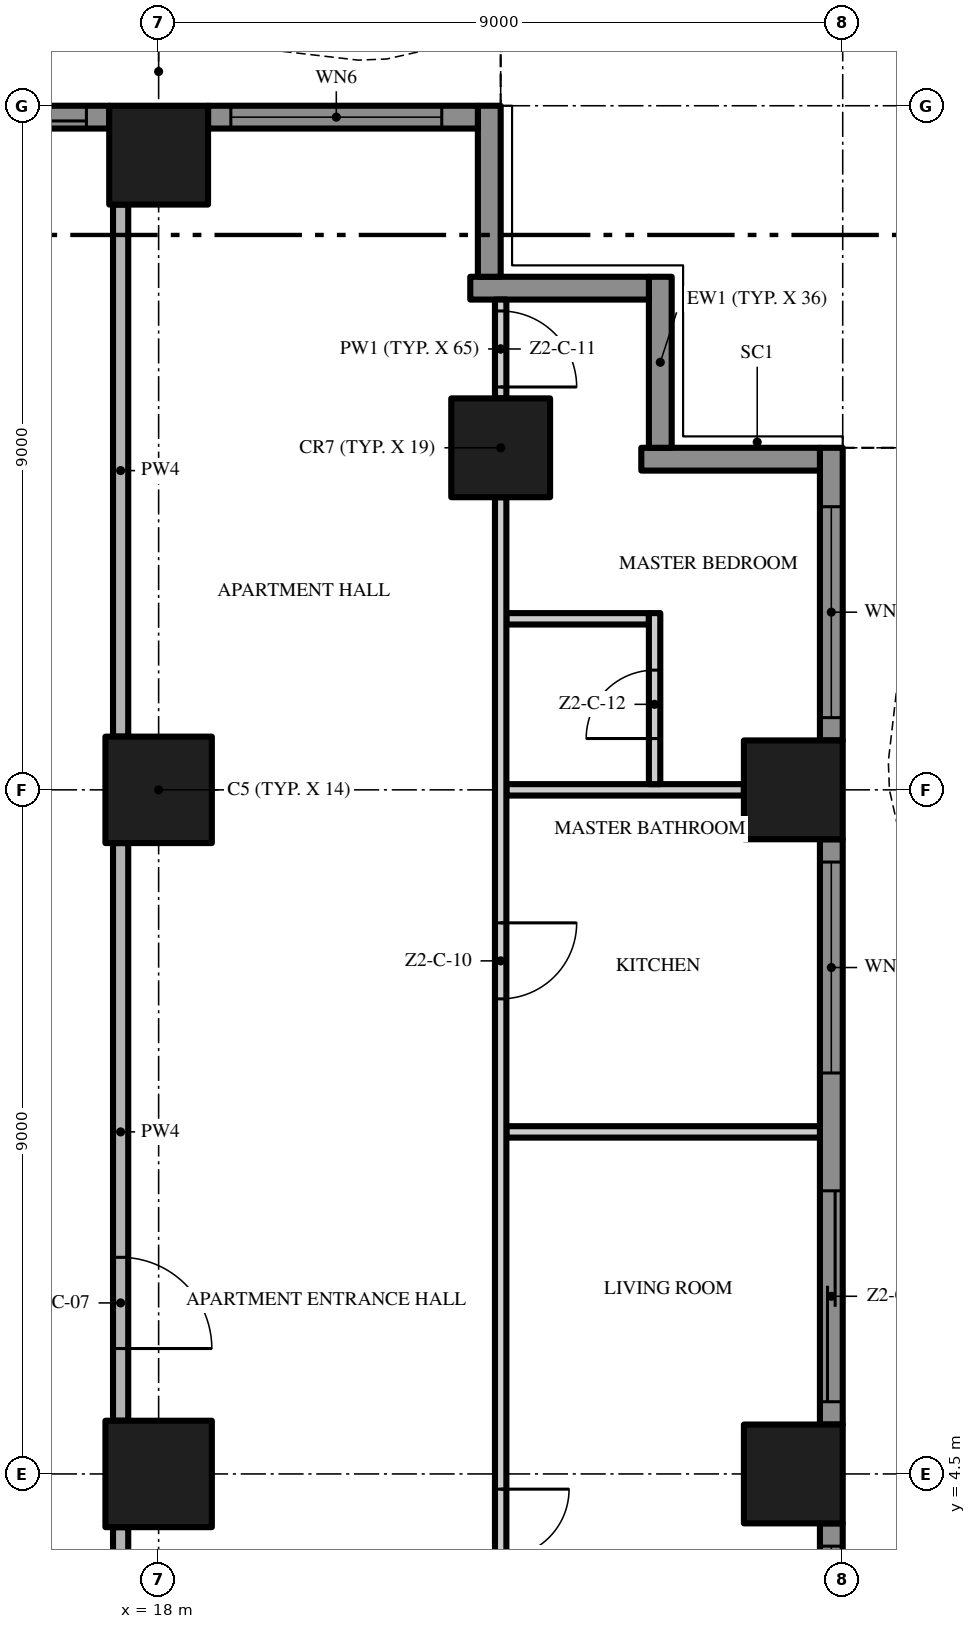
"""IFC4 building model, lengths in metres.
Left out: names, types, materials, properties, quantities, classifications, styles, units other than length and angle.
Written with IfcOpenShell. Run it as: python <this file> out.ifc"""

import sys

from ifc_helpers import new_model, si_unit, direction, frame, frame_2d, origin, origin_2d, place, context, subcontext, project, spatial, polyline, rectangle, outline, extrude, element, fill, save


model = new_model("IFC4")
c1 = context("Model", 3, precision=1e-05, world=origin(), true_north=direction((0.0, 1.0)))
c2 = subcontext(c1, "Body", "Model", "MODEL_VIEW")
j1 = project(units=[si_unit("LENGTHUNIT", "METRE"), si_unit("PLANEANGLEUNIT", "RADIAN")], contexts=[c1])
p1 = place(None, origin())
s1 = spatial("IfcSite", under=j1, at=p1, CompositionType="ELEMENT")
p2 = place(p1, origin())
s2 = spatial("IfcBuilding", under=s1, at=p2, CompositionType="ELEMENT")
p3 = place(p2, frame((0.0, 0.0, 96.0)))
s3 = spatial("IfcBuildingStorey", under=s2, at=p3, CompositionType="ELEMENT", Elevation=96.0)
p4 = place(p3, frame((18.0, 13.5, 0.0), z_axis=(0.0, 0.0, 1.0), x_axis=(1.0, 0.0, 0.0)))
e1 = element("IfcColumn", 1, at=p4, inside=s3, PredefinedType="COLUMN", context=c2, shape_type="SweptSolid", body=[
    extrude(rectangle(XDim=1.4, YDim=1.4, at=origin_2d()), origin(), (0.0, 0.0, 1.0), 3.5),
])
p5 = place(p3, frame((18.0, 21.85, 0.0), z_axis=(0.0, 0.0, 1.0), x_axis=(1.0, 0.0, 0.0)))
e2 = element("IfcColumn", 2, at=p5, inside=s3, PredefinedType="COLUMN", context=c2, shape_type="SweptSolid", body=[
    extrude(rectangle(XDim=1.3, YDim=1.3, at=origin_2d()), origin(), (0.0, 0.0, 1.0), 3.5),
])
p6 = place(p3, frame((18.0, 4.5, 0.0), z_axis=(0.0, 0.0, 1.0), x_axis=(1.0, 0.0, 0.0)))
e3 = element("IfcColumn", 3, at=p6, inside=s3, PredefinedType="COLUMN", context=c2, shape_type="SweptSolid", body=[
    extrude(rectangle(XDim=1.4, YDim=1.4, at=origin_2d()), origin(), (0.0, 0.0, 1.0), 3.5),
])
for number, where, z_axis, x_axis in (
    (4, (26.35, 13.5, 0.0), (0.0, 0.0, 1.0), (1.0, 0.0, 0.0)),
    (5, (22.5, 18.0, 0.0), (0.0, 0.0, 1.0), (1.0, 0.0, 0.0)),
    (6, (26.35, 4.5, 0.0), (0.0, 0.0, 1.0), (1.0, 0.0, 0.0)),
):
    element("IfcColumn", number, at=place(p3, frame(where, z_axis=z_axis, x_axis=x_axis)), inside=s3, PredefinedType="COLUMN", context=c2, shape_type="SweptSolid", body=[
        extrude(rectangle(XDim=1.3, YDim=1.3, at=origin_2d()), origin(), (0.0, 0.0, 1.0), 3.5),
    ])
p7 = place(p3, frame((26.85, 3.85, 0.0), z_axis=(0.0, 0.0, 1.0), x_axis=(0.0, -1.0, 0.0)))
e7 = element("IfcWall", 7, at=p7, inside=s3, PredefinedType="SOLIDWALL", context=c2, shape_type="SweptSolid", body=[
    extrude(rectangle(XDim=7.7, YDim=0.3, at=frame_2d((3.85, 0.0))), origin(), (0.0, 0.0, 1.0), 3.5),
])
p8 = place(p7, frame((4.625, 0.0, 0.45)))
e8 = element("IfcOpeningElement", 8, at=p8, cuts=e7, PredefinedType="OPENING", context=c2, shape_type="SweptSolid", body=[
    extrude(rectangle(XDim=2.775, YDim=2.65, at=frame_2d((1.387, 1.325))), frame((0.0, 0.16, 0.0), z_axis=(0.0, -1.0, 0.0), x_axis=(1.0, 0.0, 0.0)), (0.0, 0.0, 1.0), 0.32),
])
p9 = place(p7, frame((0.3, 0.0, 0.45)))
e9 = element("IfcOpeningElement", 9, at=p9, cuts=e7, PredefinedType="OPENING", context=c2, shape_type="SweptSolid", body=[
    extrude(rectangle(XDim=2.775, YDim=2.65, at=frame_2d((1.387, 1.325))), frame((0.0, 0.16, 0.0), z_axis=(0.0, -1.0, 0.0), x_axis=(1.0, 0.0, 0.0)), (0.0, 0.0, 1.0), 0.32),
])
p10 = place(p3, frame((26.85, 12.85, 0.0), z_axis=(0.0, 0.0, 1.0), x_axis=(0.0, -1.0, 0.0)))
e10 = element("IfcWall", 10, at=p10, inside=s3, PredefinedType="SOLIDWALL", context=c2, shape_type="SweptSolid", body=[
    extrude(rectangle(XDim=7.7, YDim=0.3, at=frame_2d((3.85, 0.0))), origin(), (0.0, 0.0, 1.0), 3.5),
])
p11 = place(p10, frame((4.625, 0.0, 0.0)))
e11 = element("IfcOpeningElement", 11, at=p11, cuts=e10, PredefinedType="OPENING", context=c2, shape_type="SweptSolid", body=[
    extrude(rectangle(XDim=2.775, YDim=2.4, at=frame_2d((1.387, 1.2))), frame((0.0, 0.16, 0.0), z_axis=(0.0, -1.0, 0.0), x_axis=(1.0, 0.0, 0.0)), (0.0, 0.0, 1.0), 0.32),
])
p12 = place(p10, frame((0.3, 0.0, 0.45)))
e12 = element("IfcOpeningElement", 12, at=p12, cuts=e10, PredefinedType="OPENING", context=c2, shape_type="SweptSolid", body=[
    extrude(rectangle(XDim=2.775, YDim=2.65, at=frame_2d((1.387, 1.325))), frame((0.0, 0.16, 0.0), z_axis=(0.0, -1.0, 0.0), x_axis=(1.0, 0.0, 0.0)), (0.0, 0.0, 1.0), 0.32),
])
p13 = place(p3, frame((26.85, 18.0, 0.0), z_axis=(0.0, 0.0, 1.0), x_axis=(0.0, -1.0, 0.0)))
e13 = element("IfcWall", 13, at=p13, inside=s3, PredefinedType="SOLIDWALL", context=c2, shape_type="SweptSolid", body=[
    extrude(rectangle(XDim=3.85, YDim=0.3, at=frame_2d((1.925, 0.0))), origin(), (0.0, 0.0, 1.0), 3.5),
])
p14 = place(p13, frame((0.775, 0.0, 0.45)))
e14 = element("IfcOpeningElement", 14, at=p14, cuts=e13, PredefinedType="OPENING", context=c2, shape_type="SweptSolid", body=[
    extrude(rectangle(XDim=2.775, YDim=2.65, at=frame_2d((1.387, 1.325))), frame((0.0, 0.16, 0.0), z_axis=(0.0, -1.0, 0.0), x_axis=(1.0, 0.0, 0.0)), (0.0, 0.0, 1.0), 0.32),
])
p15 = place(p3, frame((24.35, 17.85, 0.0), z_axis=(0.0, 0.0, 1.0), x_axis=(1.0, 0.0, 0.0)))
e15 = element("IfcWall", 15, at=p15, inside=s3, PredefinedType="SOLIDWALL", context=c2, shape_type="SweptSolid", body=[
    extrude(rectangle(XDim=2.35, YDim=0.3, at=frame_2d((1.175, 0.0))), origin(), (0.0, 0.0, 1.0), 3.5),
])
p16 = place(p3, frame((24.6, 20.25, 0.0), z_axis=(0.0, 0.0, 1.0), x_axis=(0.0, -1.0, 0.0)))
e16 = element("IfcWall", 16, at=p16, inside=s3, PredefinedType="SOLIDWALL", context=c2, shape_type="SweptSolid", body=[
    extrude(rectangle(XDim=2.25, YDim=0.3, at=frame_2d((1.125, 0.0))), origin(), (0.0, 0.0, 1.0), 3.5),
])
p17 = place(p3, frame((22.1, 20.1, 0.0), z_axis=(0.0, 0.0, 1.0), x_axis=(1.0, 0.0, 0.0)))
e17 = element("IfcWall", 17, at=p17, inside=s3, PredefinedType="SOLIDWALL", context=c2, shape_type="SweptSolid", body=[
    extrude(rectangle(XDim=2.35, YDim=0.3, at=frame_2d((1.175, 0.0))), origin(), (0.0, 0.0, 1.0), 3.5),
])
p18 = place(p3, frame((22.35, 22.5, 0.0), z_axis=(0.0, 0.0, 1.0), x_axis=(0.0, -1.0, 0.0)))
e18 = element("IfcWall", 18, at=p18, inside=s3, PredefinedType="SOLIDWALL", context=c2, shape_type="SweptSolid", body=[
    extrude(rectangle(XDim=2.25, YDim=0.3, at=frame_2d((1.125, 0.0))), origin(), (0.0, 0.0, 1.0), 3.5),
])
p19 = place(p3, frame((18.65, 22.35, 0.0), z_axis=(0.0, 0.0, 1.0), x_axis=(1.0, 0.0, 0.0)))
e19 = element("IfcWall", 19, at=p19, inside=s3, PredefinedType="SOLIDWALL", context=c2, shape_type="SweptSolid", body=[
    extrude(rectangle(XDim=3.55, YDim=0.3, at=frame_2d((1.775, 0.0))), origin(), (0.0, 0.0, 1.0), 3.5),
])
p20 = place(p19, frame((0.3, 0.0, 0.45)))
e20 = element("IfcOpeningElement", 20, at=p20, cuts=e19, PredefinedType="OPENING", context=c2, shape_type="SweptSolid", body=[
    extrude(rectangle(XDim=2.775, YDim=2.65, at=frame_2d((1.387, 1.325))), frame((0.0, 0.16, 0.0), z_axis=(0.0, -1.0, 0.0), x_axis=(1.0, 0.0, 0.0)), (0.0, 0.0, 1.0), 0.32),
])
p21 = place(p3, frame((13.5, 22.35, 0.0), z_axis=(0.0, 0.0, 1.0), x_axis=(1.0, 0.0, 0.0)))
e21 = element("IfcWall", 21, at=p21, inside=s3, PredefinedType="SOLIDWALL", context=c2, shape_type="SweptSolid", body=[
    extrude(rectangle(XDim=3.85, YDim=0.3, at=frame_2d((1.925, 0.0))), origin(), (0.0, 0.0, 1.0), 3.5),
])
p22 = place(p21, frame((0.775, 0.0, 0.0)))
e22 = element("IfcOpeningElement", 22, at=p22, cuts=e21, PredefinedType="OPENING", context=c2, shape_type="SweptSolid", body=[
    extrude(rectangle(XDim=2.775, YDim=2.4, at=frame_2d((1.387, 1.2))), frame((0.0, 0.16, 0.0), z_axis=(0.0, -1.0, 0.0), x_axis=(1.0, 0.0, 0.0)), (0.0, 0.0, 1.0), 0.32),
])
p23 = place(p3, origin())
e23 = element("IfcWall", 23, at=p23, inside=s3, PredefinedType="USERDEFINED", context=c2, shape_type="SweptSolid", body=[
    extrude(outline(polyline([(27.951, -18.0), (27.615, -16.5), (27.6, -16.125), (27.731, -15.0), (28.255, -13.5), (28.988, -12.0), (29.649, -10.5), (29.985, -9.0), (30.0, -8.625), (29.869, -7.5), (29.345, -6.0), (28.612, -4.5), (27.951, -3.0), (27.615, -1.5), (27.6, -1.125), (27.731, 0.0), (28.255, 1.5), (28.988, 3.0), (29.649, 4.5), (29.985, 6.0), (30.0, 6.375), (29.869, 7.5), (29.345, 9.0), (28.612, 10.5), (27.951, 12.0), (27.615, 13.5), (27.6, 13.875), (27.731, 15.0), (28.255, 16.5), (28.988, 18.0), (28.763, 18.11), (28.024, 16.596), (27.486, 15.056), (27.349, 13.885), (27.366, 13.467), (27.713, 11.921), (28.385, 10.395), (29.114, 8.904), (29.624, 7.444), (29.749, 6.365), (29.736, 6.033), (29.41, 4.579), (28.761, 3.105), (28.024, 1.596), (27.486, 0.056), (27.349, -1.115), (27.366, -1.533), (27.713, -3.079), (28.385, -4.605), (29.114, -6.096), (29.624, -7.556), (29.749, -8.635), (29.736, -8.967), (29.41, -10.421), (28.761, -11.895), (28.024, -13.404), (27.486, -14.944), (27.349, -16.115), (27.366, -16.533), (27.708, -18.055), (27.951, -18.0)])), origin(), (0.0, 0.0, 1.0), 0.9),
])
p24 = place(p3, origin())
e24 = element("IfcWall", 24, at=p24, inside=s3, PredefinedType="USERDEFINED", context=c2, shape_type="SweptSolid", body=[
    extrude(outline(polyline([(22.5, 23.451), (21.0, 23.115), (20.625, 23.1), (19.5, 23.231), (18.0, 23.755), (16.5, 24.488), (15.0, 25.149), (13.5, 25.485), (13.445, 25.241), (14.921, 24.91), (16.395, 24.261), (17.904, 23.524), (19.444, 22.986), (20.615, 22.849), (21.033, 22.866), (22.555, 23.208), (22.5, 23.451)])), origin(), (0.0, 0.0, 1.0), 0.9),
])
p25 = place(p3, frame((22.575, 9.0, 0.0), z_axis=(0.0, 0.0, 1.0), x_axis=(1.0, 0.0, 0.0)))
e25 = element("IfcWall", 25, at=p25, inside=s3, PredefinedType="PARTITIONING", context=c2, shape_type="SweptSolid", body=[
    extrude(rectangle(XDim=4.125, YDim=0.15, at=frame_2d((2.062, 0.0))), origin(), (0.0, 0.0, 1.0), 3.5),
])
p26 = place(p3, frame((22.575, 13.5, 0.0), z_axis=(0.0, 0.0, 1.0), x_axis=(1.0, 0.0, 0.0)))
e26 = element("IfcWall", 26, at=p26, inside=s3, PredefinedType="PARTITIONING", context=c2, shape_type="SweptSolid", body=[
    extrude(rectangle(XDim=3.125, YDim=0.15, at=frame_2d((1.562, 0.0))), origin(), (0.0, 0.0, 1.0), 3.5),
])
p27 = place(p3, frame((22.575, 15.75, 0.0), z_axis=(0.0, 0.0, 1.0), x_axis=(1.0, 0.0, 0.0)))
e27 = element("IfcWall", 27, at=p27, inside=s3, PredefinedType="PARTITIONING", context=c2, shape_type="SweptSolid", body=[
    extrude(rectangle(XDim=1.875, YDim=0.15, at=frame_2d((0.938, 0.0))), origin(), (0.0, 0.0, 1.0), 3.5),
])
p28 = place(p3, frame((17.5, -0.2, 0.0), z_axis=(0.0, 0.0, 1.0), x_axis=(0.0, 1.0, 0.0)))
e28 = element("IfcWall", 28, at=p28, inside=s3, PredefinedType="PARTITIONING", context=c2, shape_type="SweptSolid", body=[
    extrude(rectangle(XDim=4.0, YDim=0.2, at=frame_2d((2.0, 0.0))), origin(), (0.0, 0.0, 1.0), 3.5),
])
p29 = place(p3, frame((17.5, 12.8, 0.0), z_axis=(0.0, 0.0, 1.0), x_axis=(0.0, -1.0, 0.0)))
e29 = element("IfcWall", 29, at=p29, inside=s3, PredefinedType="PARTITIONING", context=c2, shape_type="SweptSolid", body=[
    extrude(rectangle(XDim=7.6, YDim=0.2, at=frame_2d((3.8, 0.0))), origin(), (0.0, 0.0, 1.0), 3.5),
])
p30 = place(p29, frame((5.45, 0.0, 0.0)))
e30 = element("IfcOpeningElement", 30, at=p30, cuts=e29, PredefinedType="OPENING", context=c2, shape_type="SweptSolid", body=[
    extrude(rectangle(XDim=1.2, YDim=2.4, at=frame_2d((0.6, 1.2))), frame((0.0, 0.11, 0.0), z_axis=(0.0, -1.0, 0.0), x_axis=(1.0, 0.0, 0.0)), (0.0, 0.0, 1.0), 0.22),
])
p31 = place(p3, frame((17.5, 14.2, 0.0), z_axis=(0.0, 0.0, 1.0), x_axis=(0.0, 1.0, 0.0)))
e31 = element("IfcWall", 31, at=p31, inside=s3, PredefinedType="PARTITIONING", context=c2, shape_type="SweptSolid", body=[
    extrude(rectangle(XDim=7.0, YDim=0.2, at=frame_2d((3.5, 0.0))), origin(), (0.0, 0.0, 1.0), 3.5),
])
p32 = place(p3, frame((22.5, 17.35, 0.0), z_axis=(0.0, 0.0, 1.0), x_axis=(0.0, -1.0, 0.0)))
e32 = element("IfcWall", 32, at=p32, inside=s3, PredefinedType="PARTITIONING", context=c2, shape_type="SweptSolid", body=[
    extrude(rectangle(XDim=17.25, YDim=0.15, at=frame_2d((8.625, 0.0))), origin(), (0.0, 0.0, 1.0), 3.5),
])
p33 = place(p32, frame((13.05, 0.0, 0.0)))
e33 = element("IfcOpeningElement", 33, at=p33, cuts=e32, PredefinedType="OPENING", context=c2, shape_type="SweptSolid", body=[
    extrude(rectangle(XDim=1.8, YDim=2.4, at=frame_2d((0.9, 1.2))), frame((0.0, 0.085, 0.0), z_axis=(0.0, -1.0, 0.0), x_axis=(1.0, 0.0, 0.0)), (0.0, 0.0, 1.0), 0.17),
])
p34 = place(p32, frame((5.6, 0.0, 0.0)))
e34 = element("IfcOpeningElement", 34, at=p34, cuts=e32, PredefinedType="OPENING", context=c2, shape_type="SweptSolid", body=[
    extrude(rectangle(XDim=1.0, YDim=2.4, at=frame_2d((0.5, 1.2))), frame((0.0, 0.085, 0.0), z_axis=(0.0, -1.0, 0.0), x_axis=(1.0, 0.0, 0.0)), (0.0, 0.0, 1.0), 0.17),
])
p35 = place(p3, frame((22.5, 19.95, 0.0), z_axis=(0.0, 0.0, 1.0), x_axis=(0.0, -1.0, 0.0)))
e35 = element("IfcWall", 35, at=p35, inside=s3, PredefinedType="PARTITIONING", context=c2, shape_type="SweptSolid", body=[
    extrude(rectangle(XDim=1.3, YDim=0.15, at=frame_2d((0.65, 0.0))), origin(), (0.0, 0.0, 1.0), 3.5),
])
p36 = place(p35, frame((0.15, 0.0, 0.0)))
e36 = element("IfcOpeningElement", 36, at=p36, cuts=e35, PredefinedType="OPENING", context=c2, shape_type="SweptSolid", body=[
    extrude(rectangle(XDim=1.0, YDim=2.4, at=frame_2d((0.5, 1.2))), frame((0.0, 0.085, 0.0), z_axis=(0.0, -1.0, 0.0), x_axis=(1.0, 0.0, 0.0)), (0.0, 0.0, 1.0), 0.17),
])
p37 = place(p3, frame((24.525, 13.575, 0.0), z_axis=(0.0, 0.0, 1.0), x_axis=(0.0, 1.0, 0.0)))
e37 = element("IfcWall", 37, at=p37, inside=s3, PredefinedType="PARTITIONING", context=c2, shape_type="SweptSolid", body=[
    extrude(rectangle(XDim=2.25, YDim=0.15, at=frame_2d((1.125, 0.0))), origin(), (0.0, 0.0, 1.0), 3.5),
])
p38 = place(p37, frame((0.6, 0.0, 0.0)))
e38 = element("IfcOpeningElement", 38, at=p38, cuts=e37, PredefinedType="OPENING", context=c2, shape_type="SweptSolid", body=[
    extrude(rectangle(XDim=0.9, YDim=2.1, at=frame_2d((0.45, 1.05))), frame((0.0, 0.085, 0.0), z_axis=(0.0, -1.0, 0.0), x_axis=(1.0, 0.0, 0.0)), (0.0, 0.0, 1.0), 0.17),
])
p39 = place(p9, origin())
e39 = element("IfcWindow", 39, at=p39, inside=s3, PartitioningType="SINGLE_PANEL", PredefinedType="WINDOW", context=c2, shape_type="SweptSolid", body=[
    extrude(rectangle(XDim=2.775, YDim=2.65, at=frame_2d((1.387, 1.325))), frame((0.0, 0.03, 0.0), z_axis=(0.0, -1.0, 0.0), x_axis=(1.0, 0.0, 0.0)), (0.0, 0.0, 1.0), 0.06),
])
fill(e9, e39)
p40 = place(p11, origin())
e40 = element("IfcDoor", 40, at=p40, inside=s3, OperationType="SINGLE_SWING_LEFT", PredefinedType="DOOR", context=c2, shape_type="SweptSolid", body=[
    extrude(rectangle(XDim=2.775, YDim=2.4, at=frame_2d((1.387, 1.2))), frame((0.0, 0.025, 0.0), z_axis=(0.0, -1.0, 0.0), x_axis=(1.0, 0.0, 0.0)), (0.0, 0.0, 1.0), 0.05),
])
fill(e11, e40)
p41 = place(p12, origin())
e41 = element("IfcWindow", 41, at=p41, inside=s3, PartitioningType="SINGLE_PANEL", PredefinedType="WINDOW", context=c2, shape_type="SweptSolid", body=[
    extrude(rectangle(XDim=2.775, YDim=2.65, at=frame_2d((1.387, 1.325))), frame((0.0, 0.03, 0.0), z_axis=(0.0, -1.0, 0.0), x_axis=(1.0, 0.0, 0.0)), (0.0, 0.0, 1.0), 0.06),
])
fill(e12, e41)
p42 = place(p14, origin())
e42 = element("IfcWindow", 42, at=p42, inside=s3, PartitioningType="SINGLE_PANEL", PredefinedType="WINDOW", context=c2, shape_type="SweptSolid", body=[
    extrude(rectangle(XDim=2.775, YDim=2.65, at=frame_2d((1.387, 1.325))), frame((0.0, 0.03, 0.0), z_axis=(0.0, -1.0, 0.0), x_axis=(1.0, 0.0, 0.0)), (0.0, 0.0, 1.0), 0.06),
])
fill(e14, e42)
p43 = place(p20, origin())
e43 = element("IfcWindow", 43, at=p43, inside=s3, PartitioningType="SINGLE_PANEL", PredefinedType="WINDOW", context=c2, shape_type="SweptSolid", body=[
    extrude(rectangle(XDim=2.775, YDim=2.65, at=frame_2d((1.387, 1.325))), frame((0.0, 0.03, 0.0), z_axis=(0.0, -1.0, 0.0), x_axis=(1.0, 0.0, 0.0)), (0.0, 0.0, 1.0), 0.06),
])
fill(e20, e43)
p44 = place(p22, origin())
e44 = element("IfcDoor", 44, at=p44, inside=s3, OperationType="SINGLE_SWING_LEFT", PredefinedType="DOOR", context=c2, shape_type="SweptSolid", body=[
    extrude(rectangle(XDim=2.775, YDim=2.4, at=frame_2d((1.387, 1.2))), frame((0.0, 0.025, 0.0), z_axis=(0.0, -1.0, 0.0), x_axis=(1.0, 0.0, 0.0)), (0.0, 0.0, 1.0), 0.05),
])
fill(e22, e44)
p45 = place(p30, origin())
e45 = element("IfcDoor", 45, at=p45, inside=s3, OperationType="SINGLE_SWING_RIGHT", PredefinedType="DOOR", context=c2, shape_type="SweptSolid", body=[
    extrude(rectangle(XDim=1.2, YDim=2.4, at=frame_2d((0.6, 1.2))), frame((0.0, 0.025, 0.0), z_axis=(0.0, -1.0, 0.0), x_axis=(1.0, 0.0, 0.0)), (0.0, 0.0, 1.0), 0.05),
])
fill(e30, e45)
p46 = place(p33, origin())
e46 = element("IfcDoor", 46, at=p46, inside=s3, OperationType="DOUBLE_DOOR_SINGLE_SWING", PredefinedType="DOOR", context=c2, shape_type="SweptSolid", body=[
    extrude(rectangle(XDim=1.8, YDim=2.4, at=frame_2d((0.9, 1.2))), frame((0.0, 0.025, 0.0), z_axis=(0.0, -1.0, 0.0), x_axis=(1.0, 0.0, 0.0)), (0.0, 0.0, 1.0), 0.05),
])
fill(e33, e46)
p47 = place(p34, origin())
e47 = element("IfcDoor", 47, at=p47, inside=s3, OperationType="SINGLE_SWING_LEFT", PredefinedType="DOOR", context=c2, shape_type="SweptSolid", body=[
    extrude(rectangle(XDim=1.0, YDim=2.4, at=frame_2d((0.5, 1.2))), frame((0.0, 0.025, 0.0), z_axis=(0.0, -1.0, 0.0), x_axis=(1.0, 0.0, 0.0)), (0.0, 0.0, 1.0), 0.05),
])
fill(e34, e47)
p48 = place(p36, origin())
e48 = element("IfcDoor", 48, at=p48, inside=s3, OperationType="SINGLE_SWING_RIGHT", PredefinedType="DOOR", context=c2, shape_type="SweptSolid", body=[
    extrude(rectangle(XDim=1.0, YDim=2.4, at=frame_2d((0.5, 1.2))), frame((0.0, 0.025, 0.0), z_axis=(0.0, -1.0, 0.0), x_axis=(1.0, 0.0, 0.0)), (0.0, 0.0, 1.0), 0.05),
])
fill(e36, e48)
p49 = place(p38, origin())
e49 = element("IfcDoor", 49, at=p49, inside=s3, OperationType="SINGLE_SWING_LEFT", PredefinedType="DOOR", context=c2, shape_type="SweptSolid", body=[
    extrude(rectangle(XDim=0.9, YDim=2.1, at=frame_2d((0.45, 1.05))), frame((0.0, 0.025, 0.0), z_axis=(0.0, -1.0, 0.0), x_axis=(1.0, 0.0, 0.0)), (0.0, 0.0, 1.0), 0.05),
])
fill(e38, e49)
save(model, sys.argv[1])
